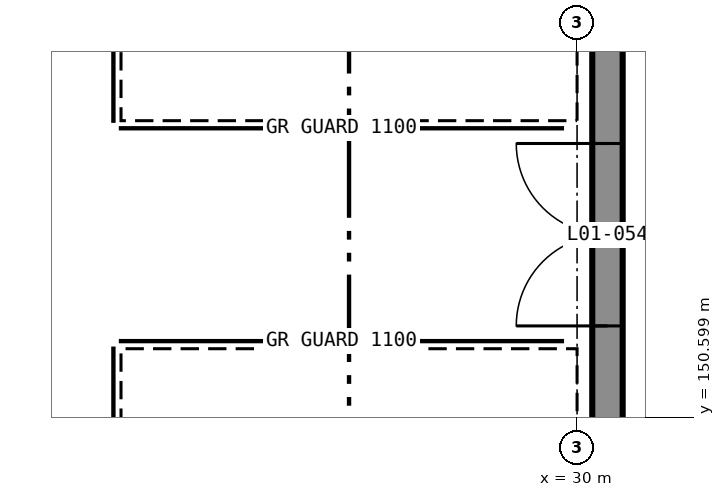
"""IFC4 building model, lengths in metres.
Left out: names, types, materials, properties, quantities, classifications, styles, units other than length and angle.
Written with IfcOpenShell. Run it as: python <this file> out.ifc"""

import sys

from ifc_helpers import new_model, si_unit, direction, frame, frame_2d, origin, place, context, subcontext, project, spatial, rectangle, extrude, element, fill, save


model = new_model("IFC4")
c1 = context("Model", 3, precision=1e-05, world=origin(), true_north=direction((0.0, 1.0)))
c2 = subcontext(c1, "Body", "Model", "MODEL_VIEW")
j1 = project(units=[si_unit("LENGTHUNIT", "METRE"), si_unit("PLANEANGLEUNIT", "RADIAN")], contexts=[c1])
p1 = place(None, origin())
s1 = spatial("IfcSite", under=j1, at=p1, CompositionType="ELEMENT")
p2 = place(p1, origin())
s2 = spatial("IfcBuilding", under=s1, at=p2, CompositionType="ELEMENT")
p3 = place(p2, frame((0.0, 0.0, 6.0)))
s3 = spatial("IfcBuildingStorey", under=s2, at=p3, CompositionType="ELEMENT", Elevation=6.0)
p4 = place(p3, frame((30.4, 150.5, 0.0), z_axis=(0.0, 0.0, 1.0), x_axis=(0.0, 1.0, 0.0)))
e1 = element("IfcWall", 1, at=p4, inside=s3, PredefinedType="SOLIDWALL", context=c2, shape_type="SweptSolid", body=[
    extrude(rectangle(XDim=11.0, YDim=0.4, at=frame_2d((5.5, 0.0))), origin(), (0.0, 0.0, 1.0), 6.0),
])
p5 = place(p4, frame((1.3, 0.0, 0.0)))
e2 = element("IfcOpeningElement", 2, at=p5, cuts=e1, PredefinedType="OPENING", context=c2, shape_type="SweptSolid", body=[
    extrude(rectangle(XDim=2.4, YDim=2.4, at=frame_2d((1.2, 1.2))), frame((0.0, 0.21, 0.0), z_axis=(0.0, -1.0, 0.0), x_axis=(1.0, 0.0, 0.0)), (0.0, 0.0, 1.0), 0.42),
])
p6 = place(p5, origin())
e3 = element("IfcDoor", 3, at=p6, inside=s3, OperationType="DOUBLE_DOOR_SINGLE_SWING", PredefinedType="DOOR", context=c2, shape_type="SweptSolid", body=[
    extrude(rectangle(XDim=2.4, YDim=2.4, at=frame_2d((1.2, 1.2))), frame((0.0, 0.025, 0.0), z_axis=(0.0, -1.0, 0.0), x_axis=(1.0, 0.0, 0.0)), (0.0, 0.0, 1.0), 0.05),
])
fill(e2, e3)
save(model, sys.argv[1])
